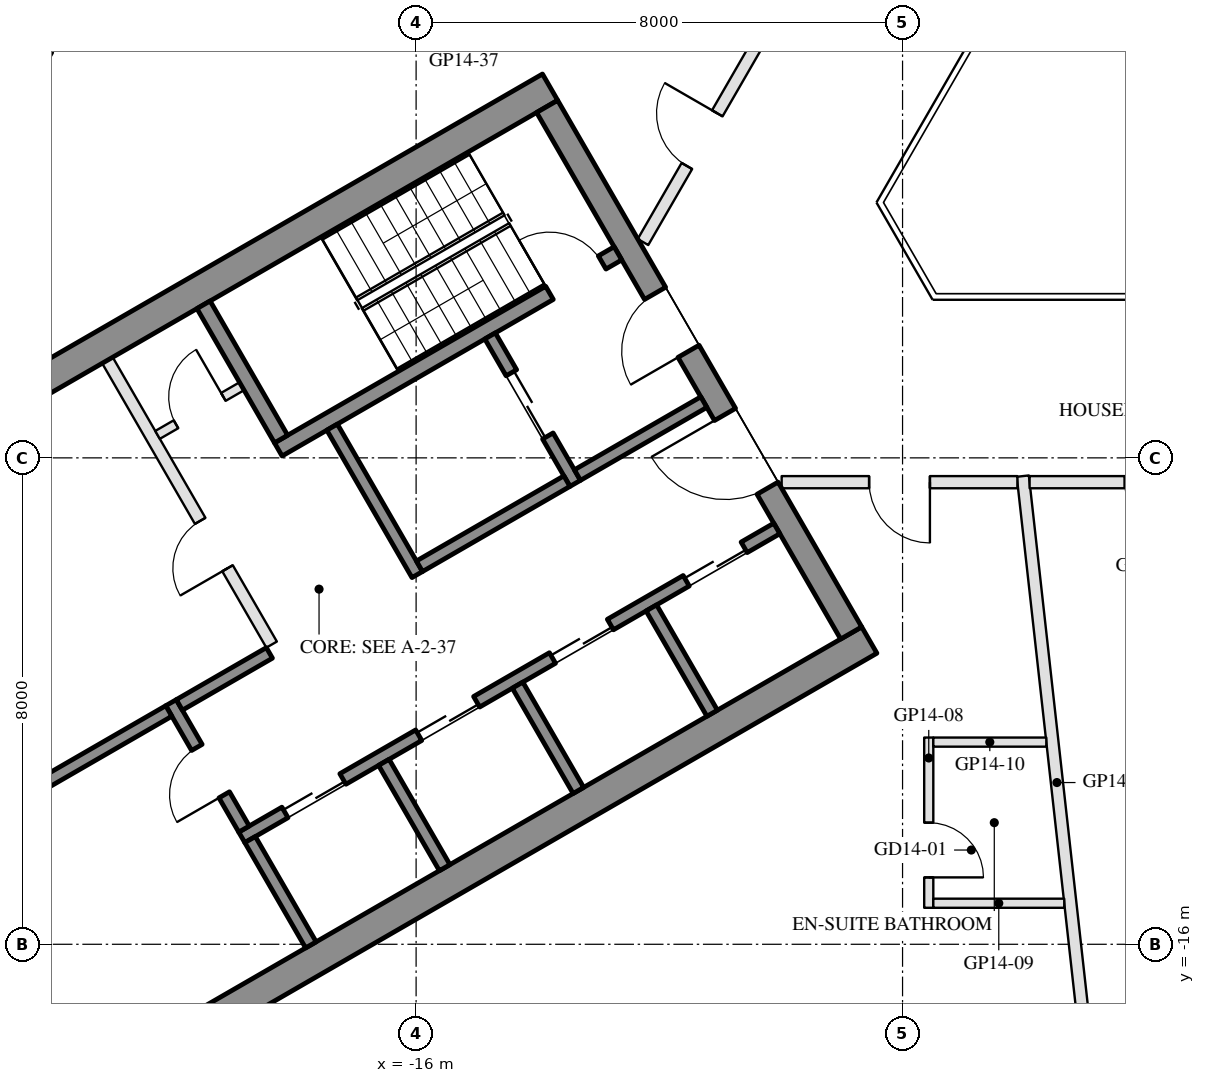
"""IFC4 building model, lengths in metres.
Left out: names, types, materials, properties, quantities, classifications, styles, units other than length and angle.
Written with IfcOpenShell. Run it as: python <this file> out.ifc"""

import sys

from ifc_helpers import new_model, si_unit, direction, frame, frame_2d, origin, place, context, subcontext, project, spatial, rectangle, extrude, element, fill, save


model = new_model("IFC4")
c1 = context("Model", 3, precision=1e-05, world=origin(), true_north=direction((0.0, 1.0)))
c2 = subcontext(c1, "Body", "Model", "MODEL_VIEW")
j1 = project(units=[si_unit("LENGTHUNIT", "METRE"), si_unit("PLANEANGLEUNIT", "RADIAN")], contexts=[c1])
p1 = place(None, origin())
s1 = spatial("IfcSite", under=j1, at=p1, CompositionType="ELEMENT")
p2 = place(p1, origin())
s2 = spatial("IfcBuilding", under=s1, at=p2, CompositionType="ELEMENT")
p3 = place(p2, frame((0.0, 0.0, 161.4)))
s3 = spatial("IfcBuildingStorey", under=s2, at=p3, CompositionType="ELEMENT", Elevation=161.4)
p4 = place(p3, frame((-20.309, 1.934, 0.0), z_axis=(0.0, 0.0, 1.0), x_axis=(-0.499992114976, -0.866029956157, 0.0)))
e1 = element("IfcWall", 1, at=p4, inside=s3, PredefinedType="SOLIDWALL", context=c2, shape_type="SweptSolid", body=[
    extrude(rectangle(XDim=6.74, YDim=0.35, at=frame_2d((3.37, 0.0))), origin(), (0.0, 0.0, 1.0), 3.55),
])
p5 = place(p4, frame((4.02, 0.0, 0.0)))
e2 = element("IfcOpeningElement", 2, at=p5, cuts=e1, PredefinedType="OPENING", context=c2, shape_type="SweptSolid", body=[
    extrude(rectangle(XDim=2.4, YDim=2.4, at=frame_2d((1.2, 1.2))), frame((0.0, 0.185, 0.0), z_axis=(0.0, -1.0, 0.0), x_axis=(1.0, 0.0, 0.0)), (0.0, 0.0, 1.0), 0.37),
])
p6 = place(p4, frame((0.77, 0.0, 0.3)))
e3 = element("IfcOpeningElement", 3, at=p6, cuts=e1, PredefinedType="OPENING", context=c2, shape_type="SweptSolid", body=[
    extrude(rectangle(XDim=2.9, YDim=2.65, at=frame_2d((1.45, 1.325))), frame((0.0, 0.185, 0.0), z_axis=(0.0, -1.0, 0.0), x_axis=(1.0, 0.0, 0.0)), (0.0, 0.0, 1.0), 0.37),
])
for number, where, z_axis, x_axis in (
    (4, (-13.797, -1.903, 0.0), (0.0, 0.0, 1.0), (-0.866, -0.5, 0.0)),
    (5, (-8.547, -10.997, 0.0), (0.0, 0.0, 1.0), (-0.866, -0.5, 0.0)),
):
    element("IfcWall", number, at=place(p3, frame(where, z_axis=z_axis, x_axis=x_axis)), inside=s3, PredefinedType="SHEAR", context=c2, shape_type="SweptSolid", body=[
        extrude(rectangle(XDim=14.837, YDim=0.5, at=frame_2d((7.418, 0.0))), origin(), (0.0, 0.0, 1.0), 3.5),
    ])
p7 = place(p3, frame((-13.845, -2.22, 0.0), z_axis=(0.0, 0.0, 1.0), x_axis=(0.500004234368, -0.866022959057, 0.0)))
e6 = element("IfcWall", 6, at=p7, inside=s3, PredefinedType="SHEAR", context=c2, shape_type="SweptSolid", body=[
    extrude(rectangle(XDim=10.0, YDim=0.4, at=frame_2d((5.0, 0.0))), origin(), (0.0, 0.0, 1.0), 3.5),
])
p8 = place(p7, frame((3.55, 0.0, 0.0)))
e7 = element("IfcOpeningElement", 7, at=p8, cuts=e6, PredefinedType="OPENING", context=c2, shape_type="SweptSolid", body=[
    extrude(rectangle(XDim=1.1, YDim=2.1, at=frame_2d((0.55, 1.05))), frame((0.0, 0.21, 0.0), z_axis=(0.0, -1.0, 0.0), x_axis=(1.0, 0.0, 0.0)), (0.0, 0.0, 1.0), 0.42),
])
p9 = place(p7, frame((5.85, 0.0, 0.0)))
e8 = element("IfcOpeningElement", 8, at=p9, cuts=e6, PredefinedType="OPENING", context=c2, shape_type="SweptSolid", body=[
    extrude(rectangle(XDim=1.4, YDim=2.1, at=frame_2d((0.7, 1.05))), frame((0.0, 0.21, 0.0), z_axis=(0.0, -1.0, 0.0), x_axis=(1.0, 0.0, 0.0)), (0.0, 0.0, 1.0), 0.42),
])
p10 = place(p3, frame((-12.681, -4.636, 0.0), z_axis=(0.0, 0.0, 1.0), x_axis=(-0.866021702275, -0.500006411147, 0.0)))
e9 = element("IfcWall", 9, at=p10, inside=s3, PredefinedType="SHEAR", context=c2, shape_type="SweptSolid", body=[
    extrude(rectangle(XDim=6.45, YDim=0.25, at=frame_2d((3.225, 0.0))), origin(), (0.0, 0.0, 1.0), 3.5),
])
p11 = place(p10, frame((0.3, 0.0, 0.0)))
e10 = element("IfcOpeningElement", 10, at=p11, cuts=e9, PredefinedType="OPENING", context=c2, shape_type="SweptSolid", body=[
    extrude(rectangle(XDim=1.0, YDim=2.1, at=frame_2d((0.5, 1.05))), frame((0.0, 0.135, 0.0), z_axis=(0.0, -1.0, 0.0), x_axis=(1.0, 0.0, 0.0)), (0.0, 0.0, 1.0), 0.27),
])
p12 = place(p3, frame((-19.496, -5.482, 0.0), z_axis=(0.0, 0.0, 1.0), x_axis=(0.499990435942, -0.866030925526, 0.0)))
e11 = element("IfcWall", 11, at=p12, inside=s3, PredefinedType="SHEAR", context=c2, shape_type="SweptSolid", body=[
    extrude(rectangle(XDim=2.55, YDim=0.25, at=frame_2d((1.275, 0.0))), origin(), (0.0, 0.0, 1.0), 3.5),
])
p13 = place(p3, frame((-17.381, -7.495, 0.0), z_axis=(0.0, 0.0, 1.0), x_axis=(0.500011755427, -0.866018616679, 0.0)))
e12 = element("IfcWall", 12, at=p13, inside=s3, PredefinedType="SHEAR", context=c2, shape_type="SweptSolid", body=[
    extrude(rectangle(XDim=2.8, YDim=0.2, at=frame_2d((1.4, 0.0))), origin(), (0.0, 0.0, 1.0), 3.5),
])
p14 = place(p3, frame((-14.783, -5.995, 0.0), z_axis=(0.0, 0.0, 1.0), x_axis=(0.49994636267, -0.866056369097, 0.0)))
e13 = element("IfcWall", 13, at=p14, inside=s3, PredefinedType="SHEAR", context=c2, shape_type="SweptSolid", body=[
    extrude(rectangle(XDim=2.8, YDim=0.2, at=frame_2d((1.4, 0.0))), origin(), (0.0, 0.0, 1.0), 3.5),
])
p15 = place(p14, frame((0.7, 0.0, 0.0)))
e14 = element("IfcOpeningElement", 14, at=p15, cuts=e13, PredefinedType="OPENING", context=c2, shape_type="SweptSolid", body=[
    extrude(rectangle(XDim=1.2, YDim=2.1, at=frame_2d((0.6, 1.05))), frame((0.0, 0.11, 0.0), z_axis=(0.0, -1.0, 0.0), x_axis=(1.0, 0.0, 0.0)), (0.0, 0.0, 1.0), 0.22),
])
p16 = place(p3, frame((-13.52, -8.383, 0.0), z_axis=(0.0, 0.0, 1.0), x_axis=(-0.866034573852, -0.49998411664, 0.0)))
e15 = element("IfcWall", 15, at=p16, inside=s3, PredefinedType="SHEAR", context=c2, shape_type="SweptSolid", body=[
    extrude(rectangle(XDim=2.8, YDim=0.2, at=frame_2d((1.4, 0.0))), origin(), (0.0, 0.0, 1.0), 3.5),
])
p17 = place(p3, frame((-11.268, -7.083, 0.0), z_axis=(0.0, 0.0, 1.0), x_axis=(-0.866050077142, -0.499957262057, 0.0)))
e16 = element("IfcWall", 16, at=p17, inside=s3, PredefinedType="SHEAR", context=c2, shape_type="SweptSolid", body=[
    extrude(rectangle(XDim=2.4, YDim=0.2, at=frame_2d((1.2, 0.0))), origin(), (0.0, 0.0, 1.0), 3.5),
])
p18 = place(p3, frame((-10.068, -9.162, 0.0), z_axis=(0.0, 0.0, 1.0), x_axis=(-0.866032725843, -0.499987317609, 0.0)))
e17 = element("IfcWall", 17, at=p18, inside=s3, PredefinedType="SHEAR", context=c2, shape_type="SweptSolid", body=[
    extrude(rectangle(XDim=10.16, YDim=0.2, at=frame_2d((5.08, 0.0))), origin(), (0.0, 0.0, 1.0), 3.5),
])
p19 = place(p18, frame((0.62, 0.0, 0.0)))
e18 = element("IfcOpeningElement", 18, at=p19, cuts=e17, PredefinedType="OPENING", context=c2, shape_type="SweptSolid", body=[
    extrude(rectangle(XDim=1.1, YDim=2.1, at=frame_2d((0.55, 1.05))), frame((0.0, 0.11, 0.0), z_axis=(0.0, -1.0, 0.0), x_axis=(1.0, 0.0, 0.0)), (0.0, 0.0, 1.0), 0.22),
])
p20 = place(p18, frame((3.16, 0.0, 0.0)))
e19 = element("IfcOpeningElement", 19, at=p20, cuts=e17, PredefinedType="OPENING", context=c2, shape_type="SweptSolid", body=[
    extrude(rectangle(XDim=1.1, YDim=2.1, at=frame_2d((0.55, 1.05))), frame((0.0, 0.11, 0.0), z_axis=(0.0, -1.0, 0.0), x_axis=(1.0, 0.0, 0.0)), (0.0, 0.0, 1.0), 0.22),
])
p21 = place(p18, frame((5.7, 0.0, 0.0)))
e20 = element("IfcOpeningElement", 20, at=p21, cuts=e17, PredefinedType="OPENING", context=c2, shape_type="SweptSolid", body=[
    extrude(rectangle(XDim=1.1, YDim=2.1, at=frame_2d((0.55, 1.05))), frame((0.0, 0.11, 0.0), z_axis=(0.0, -1.0, 0.0), x_axis=(1.0, 0.0, 0.0)), (0.0, 0.0, 1.0), 0.22),
])
p22 = place(p18, frame((8.24, 0.0, 0.0)))
e21 = element("IfcOpeningElement", 21, at=p22, cuts=e17, PredefinedType="OPENING", context=c2, shape_type="SweptSolid", body=[
    extrude(rectangle(XDim=1.1, YDim=2.1, at=frame_2d((0.55, 1.05))), frame((0.0, 0.11, 0.0), z_axis=(0.0, -1.0, 0.0), x_axis=(1.0, 0.0, 0.0)), (0.0, 0.0, 1.0), 0.22),
])
p23 = place(p3, frame((-20.031, -12.026, 0.0), z_axis=(0.0, 0.0, 1.0), x_axis=(0.500033551112, -0.866006032174, 0.0)))
e22 = element("IfcWall", 22, at=p23, inside=s3, PredefinedType="SHEAR", context=c2, shape_type="SweptSolid", body=[
    extrude(rectangle(XDim=2.4, YDim=0.2, at=frame_2d((1.2, 0.0))), origin(), (0.0, 0.0, 1.0), 3.5),
])
p24 = place(p23, frame((0.85, 0.0, 0.0)))
e23 = element("IfcOpeningElement", 23, at=p24, cuts=e22, PredefinedType="OPENING", context=c2, shape_type="SweptSolid", body=[
    extrude(rectangle(XDim=0.9, YDim=2.1, at=frame_2d((0.45, 1.05))), frame((0.0, 0.11, 0.0), z_axis=(0.0, -1.0, 0.0), x_axis=(1.0, 0.0, 0.0)), (0.0, 0.0, 1.0), 0.22),
])
p25 = place(p3, frame((-18.413, -11.208, 0.0), z_axis=(0.0, 0.0, 1.0), x_axis=(-0.866038183914, -0.499977863513, 0.0)))
e24 = element("IfcWall", 24, at=p25, inside=s3, PredefinedType="SHEAR", context=c2, shape_type="SweptSolid", body=[
    extrude(rectangle(XDim=1.71, YDim=0.2, at=frame_2d((0.855, 0.0))), origin(), (0.0, 0.0, 1.0), 3.5),
])
for number, where, z_axis, x_axis in (
    (25, (-12.131, -10.468, 0.0), (0.0, 0.0, 1.0), (0.5, -0.866, 0.0)),
    (26, (-14.331, -11.738, 0.0), (0.0, 0.0, 1.0), (0.5, -0.866, 0.0)),
    (27, (-16.531, -13.008, 0.0), (0.0, 0.0, 1.0), (0.5, -0.866, 0.0)),
    (28, (-18.73, -14.278, 0.0), (0.0, 0.0, 1.0), (0.5, -0.866, 0.0)),
):
    element("IfcWall", number, at=place(p3, frame(where, z_axis=z_axis, x_axis=x_axis)), inside=s3, PredefinedType="SHEAR", context=c2, shape_type="SweptSolid", body=[
        extrude(rectangle(XDim=2.0, YDim=0.2, at=frame_2d((1.0, 0.0))), origin(), (0.0, 0.0, 1.0), 3.5),
    ])
p26 = place(p3, frame((-20.067, -12.163, 0.0), z_axis=(0.0, 0.0, 1.0), x_axis=(-0.866055327414, -0.49994816717, 0.0)))
e29 = element("IfcWall", 29, at=p26, inside=s3, PredefinedType="SHEAR", context=c2, shape_type="SweptSolid", body=[
    extrude(rectangle(XDim=2.84, YDim=0.2, at=frame_2d((1.42, 0.0))), origin(), (0.0, 0.0, 1.0), 3.5),
])
p27 = place(p3, frame((-21.076, -6.395, 0.0), z_axis=(0.0, 0.0, 1.0), x_axis=(0.50001468107, -0.866016927499, 0.0)))
e30 = element("IfcWall", 30, at=p27, inside=s3, PredefinedType="PARTITIONING", context=c2, shape_type="SweptSolid", body=[
    extrude(rectangle(XDim=5.4, YDim=0.2, at=frame_2d((2.7, 0.0))), origin(), (0.0, 0.0, 1.0), 3.5),
])
p28 = place(p27, frame((3.05, 0.0, 0.0)))
e31 = element("IfcOpeningElement", 31, at=p28, cuts=e30, PredefinedType="OPENING", context=c2, shape_type="SweptSolid", body=[
    extrude(rectangle(XDim=0.9, YDim=2.1, at=frame_2d((0.45, 1.05))), frame((0.0, 0.11, 0.0), z_axis=(0.0, -1.0, 0.0), x_axis=(1.0, 0.0, 0.0)), (0.0, 0.0, 1.0), 0.22),
])
p29 = place(p3, frame((-18.866, -6.822, 0.0), z_axis=(0.0, 0.0, 1.0), x_axis=(-0.866028054938, -0.499995408039, 0.0)))
e32 = element("IfcWall", 32, at=p29, inside=s3, PredefinedType="PARTITIONING", context=c2, shape_type="SweptSolid", body=[
    extrude(rectangle(XDim=1.6, YDim=0.15, at=frame_2d((0.8, 0.0))), origin(), (0.0, 0.0, 1.0), 3.5),
])
p30 = place(p29, frame((0.35, 0.0, 0.0)))
e33 = element("IfcOpeningElement", 33, at=p30, cuts=e32, PredefinedType="OPENING", context=c2, shape_type="SweptSolid", body=[
    extrude(rectangle(XDim=0.9, YDim=2.1, at=frame_2d((0.45, 1.05))), frame((0.0, 0.085, 0.0), z_axis=(0.0, -1.0, 0.0), x_axis=(1.0, 0.0, 0.0)), (0.0, 0.0, 1.0), 0.17),
])
p31 = place(p3, frame((-4.9, -18.38, 0.0), z_axis=(0.0, 0.0, 1.0), x_axis=(-0.110634961609, 0.993861109648, 0.0)))
e34 = element("IfcWall", 34, at=p31, inside=s3, PredefinedType="PARTITIONING", context=c2, shape_type="SweptSolid", body=[
    extrude(rectangle(XDim=10.142, YDim=0.2, at=frame_2d((5.071, 0.0))), origin(), (0.0, 0.0, 1.0), 3.06),
])
p32 = place(p3, frame((-6.112, -8.4, 0.0), z_axis=(0.0, 0.0, 1.0), x_axis=(-1.0, 0.0, 0.0)))
e35 = element("IfcWall", 35, at=p32, inside=s3, PredefinedType="PARTITIONING", context=c2, shape_type="SweptSolid", body=[
    extrude(rectangle(XDim=3.876, YDim=0.2, at=frame_2d((1.938, 0.0))), origin(), (0.0, 0.0, 1.0), 2.95),
])
p33 = place(p32, frame((1.438, 0.0, 0.0)))
e36 = element("IfcOpeningElement", 36, at=p33, cuts=e35, PredefinedType="OPENING", context=c2, shape_type="SweptSolid", body=[
    extrude(rectangle(XDim=1.0, YDim=2.1, at=frame_2d((0.5, 1.05))), frame((0.0, 0.11, 0.0), z_axis=(0.0, -1.0, 0.0), x_axis=(1.0, 0.0, 0.0)), (0.0, 0.0, 1.0), 0.22),
])
p34 = place(p3, frame((-7.569, -12.6, 0.0), z_axis=(0.0, 0.0, 1.0), x_axis=(0.0, -1.0, 0.0)))
e37 = element("IfcWall", 37, at=p34, inside=s3, PredefinedType="PARTITIONING", context=c2, shape_type="SweptSolid", body=[
    extrude(rectangle(XDim=2.8, YDim=0.15, at=frame_2d((1.4, 0.0))), origin(), (0.0, 0.0, 1.0), 3.55),
])
p35 = place(p34, frame((1.4, 0.0, 0.0)))
e38 = element("IfcOpeningElement", 38, at=p35, cuts=e37, PredefinedType="OPENING", context=c2, shape_type="SweptSolid", body=[
    extrude(rectangle(XDim=0.9, YDim=2.1, at=frame_2d((0.45, 1.05))), frame((0.0, 0.085, 0.0), z_axis=(0.0, -1.0, 0.0), x_axis=(1.0, 0.0, 0.0)), (0.0, 0.0, 1.0), 0.17),
])
p36 = place(p3, frame((-7.494, -15.325, 0.0), z_axis=(0.0, 0.0, 1.0), x_axis=(1.0, 0.0, 0.0)))
e39 = element("IfcWall", 39, at=p36, inside=s3, PredefinedType="PARTITIONING", context=c2, shape_type="SweptSolid", body=[
    extrude(rectangle(XDim=2.153, YDim=0.15, at=frame_2d((1.077, 0.0))), origin(), (0.0, 0.0, 1.0), 3.55),
])
p37 = place(p3, frame((-7.494, -12.675, 0.0), z_axis=(0.0, 0.0, 1.0), x_axis=(1.0, 0.0, 0.0)))
e40 = element("IfcWall", 40, at=p37, inside=s3, PredefinedType="PARTITIONING", context=c2, shape_type="SweptSolid", body=[
    extrude(rectangle(XDim=1.858, YDim=0.15, at=frame_2d((0.929, 0.0))), origin(), (0.0, 0.0, 1.0), 3.55),
])
p38 = place(p3, frame((-1.881, -8.4, 0.0), z_axis=(0.0, 0.0, 1.0), x_axis=(-1.0, 0.0, 0.0)))
e41 = element("IfcWall", 41, at=p38, inside=s3, PredefinedType="PARTITIONING", context=c2, shape_type="SweptSolid", body=[
    extrude(rectangle(XDim=4.03, YDim=0.2, at=frame_2d((2.015, 0.0))), origin(), (0.0, 0.0, 1.0), 2.95),
])
p39 = place(p38, frame((1.565, 0.0, 0.0)))
e42 = element("IfcOpeningElement", 42, at=p39, cuts=e41, PredefinedType="OPENING", context=c2, shape_type="SweptSolid", body=[
    extrude(rectangle(XDim=0.9, YDim=2.1, at=frame_2d((0.45, 1.05))), frame((0.0, 0.11, 0.0), z_axis=(0.0, -1.0, 0.0), x_axis=(1.0, 0.0, 0.0)), (0.0, 0.0, 1.0), 0.22),
])
p40 = place(p3, frame((-12.269, -4.45, 0.0), z_axis=(0.0, 0.0, 1.0), x_axis=(0.500008716408, 0.866020371305, 0.0)))
e43 = element("IfcWall", 43, at=p40, inside=s3, PredefinedType="PARTITIONING", context=c2, shape_type="SweptSolid", body=[
    extrude(rectangle(XDim=3.888, YDim=0.2, at=frame_2d((1.944, 0.0))), origin(), (0.0, 0.0, 1.0), 2.95),
])
p41 = place(p40, frame((1.444, 0.0, 0.0)))
e44 = element("IfcOpeningElement", 44, at=p41, cuts=e43, PredefinedType="OPENING", context=c2, shape_type="SweptSolid", body=[
    extrude(rectangle(XDim=1.0, YDim=2.1, at=frame_2d((0.5, 1.05))), frame((0.0, 0.11, 0.0), z_axis=(0.0, -1.0, 0.0), x_axis=(1.0, 0.0, 0.0)), (0.0, 0.0, 1.0), 0.22),
])
p42 = place(p15, origin())
e45 = element("IfcDoor", 45, at=p42, inside=s3, OperationType="DOUBLE_DOOR_SLIDING", PredefinedType="DOOR", context=c2, shape_type="SweptSolid", body=[
    extrude(rectangle(XDim=1.2, YDim=2.1, at=frame_2d((0.6, 1.05))), frame((0.0, 0.025, 0.0), z_axis=(0.0, -1.0, 0.0), x_axis=(1.0, 0.0, 0.0)), (0.0, 0.0, 1.0), 0.05),
])
fill(e14, e45)
p43 = place(p30, frame((0.9, 0.0, 0.0), z_axis=(0.0, 0.0, 1.0), x_axis=(-1.0, 0.0, 0.0)))
e46 = element("IfcDoor", 46, at=p43, inside=s3, OperationType="SINGLE_SWING_RIGHT", PredefinedType="DOOR", context=c2, shape_type="SweptSolid", body=[
    extrude(rectangle(XDim=0.9, YDim=2.1, at=frame_2d((0.45, 1.05))), frame((0.0, 0.025, 0.0), z_axis=(0.0, -1.0, 0.0), x_axis=(1.0, 0.0, 0.0)), (0.0, 0.0, 1.0), 0.05),
])
fill(e33, e46)
p44 = place(p19, origin())
e47 = element("IfcDoor", 47, at=p44, inside=s3, OperationType="DOUBLE_DOOR_SLIDING", PredefinedType="DOOR", context=c2, shape_type="SweptSolid", body=[
    extrude(rectangle(XDim=1.1, YDim=2.1, at=frame_2d((0.55, 1.05))), frame((0.0, 0.025, 0.0), z_axis=(0.0, -1.0, 0.0), x_axis=(1.0, 0.0, 0.0)), (0.0, 0.0, 1.0), 0.05),
])
fill(e18, e47)
p45 = place(p20, origin())
e48 = element("IfcDoor", 48, at=p45, inside=s3, OperationType="DOUBLE_DOOR_SLIDING", PredefinedType="DOOR", context=c2, shape_type="SweptSolid", body=[
    extrude(rectangle(XDim=1.1, YDim=2.1, at=frame_2d((0.55, 1.05))), frame((0.0, 0.025, 0.0), z_axis=(0.0, -1.0, 0.0), x_axis=(1.0, 0.0, 0.0)), (0.0, 0.0, 1.0), 0.05),
])
fill(e19, e48)
p46 = place(p21, origin())
e49 = element("IfcDoor", 49, at=p46, inside=s3, OperationType="DOUBLE_DOOR_SLIDING", PredefinedType="DOOR", context=c2, shape_type="SweptSolid", body=[
    extrude(rectangle(XDim=1.1, YDim=2.1, at=frame_2d((0.55, 1.05))), frame((0.0, 0.025, 0.0), z_axis=(0.0, -1.0, 0.0), x_axis=(1.0, 0.0, 0.0)), (0.0, 0.0, 1.0), 0.05),
])
fill(e20, e49)
p47 = place(p22, origin())
e50 = element("IfcDoor", 50, at=p47, inside=s3, OperationType="DOUBLE_DOOR_SLIDING", PredefinedType="DOOR", context=c2, shape_type="SweptSolid", body=[
    extrude(rectangle(XDim=1.1, YDim=2.1, at=frame_2d((0.55, 1.05))), frame((0.0, 0.025, 0.0), z_axis=(0.0, -1.0, 0.0), x_axis=(1.0, 0.0, 0.0)), (0.0, 0.0, 1.0), 0.05),
])
fill(e21, e50)
p48 = place(p24, frame((0.9, 0.0, 0.0), z_axis=(0.0, 0.0, 1.0), x_axis=(-1.0, 0.0, 0.0)))
e51 = element("IfcDoor", 51, at=p48, inside=s3, OperationType="SINGLE_SWING_LEFT", PredefinedType="DOOR", context=c2, shape_type="SweptSolid", body=[
    extrude(rectangle(XDim=0.9, YDim=2.1, at=frame_2d((0.45, 1.05))), frame((0.0, 0.025, 0.0), z_axis=(0.0, -1.0, 0.0), x_axis=(1.0, 0.0, 0.0)), (0.0, 0.0, 1.0), 0.05),
])
fill(e23, e51)
p49 = place(p28, frame((0.9, 0.0, 0.0), z_axis=(0.0, 0.0, 1.0), x_axis=(-1.0, 0.0, 0.0)))
e52 = element("IfcDoor", 52, at=p49, inside=s3, OperationType="SINGLE_SWING_LEFT", PredefinedType="DOOR", context=c2, shape_type="SweptSolid", body=[
    extrude(rectangle(XDim=0.9, YDim=2.1, at=frame_2d((0.45, 1.05))), frame((0.0, 0.025, 0.0), z_axis=(0.0, -1.0, 0.0), x_axis=(1.0, 0.0, 0.0)), (0.0, 0.0, 1.0), 0.05),
])
fill(e31, e52)
p50 = place(p8, frame((1.1, 0.0, 0.0), z_axis=(0.0, 0.0, 1.0), x_axis=(-1.0, 0.0, 0.0)))
e53 = element("IfcDoor", 53, at=p50, inside=s3, OperationType="SINGLE_SWING_LEFT", PredefinedType="DOOR", context=c2, shape_type="SweptSolid", body=[
    extrude(rectangle(XDim=1.1, YDim=2.1, at=frame_2d((0.55, 1.05))), frame((0.0, 0.025, 0.0), z_axis=(0.0, -1.0, 0.0), x_axis=(1.0, 0.0, 0.0)), (0.0, 0.0, 1.0), 0.05),
])
fill(e7, e53)
p51 = place(p9, frame((1.4, 0.0, 0.0), z_axis=(0.0, 0.0, 1.0), x_axis=(-1.0, 0.0, 0.0)))
e54 = element("IfcDoor", 54, at=p51, inside=s3, OperationType="DOUBLE_DOOR_SINGLE_SWING", PredefinedType="DOOR", context=c2, shape_type="SweptSolid", body=[
    extrude(rectangle(XDim=1.4, YDim=2.1, at=frame_2d((0.7, 1.05))), frame((0.0, 0.025, 0.0), z_axis=(0.0, -1.0, 0.0), x_axis=(1.0, 0.0, 0.0)), (0.0, 0.0, 1.0), 0.05),
])
fill(e8, e54)
p52 = place(p11, frame((1.0, 0.0, 0.0), z_axis=(0.0, 0.0, 1.0), x_axis=(-1.0, 0.0, 0.0)))
e55 = element("IfcDoor", 55, at=p52, inside=s3, OperationType="SINGLE_SWING_LEFT", PredefinedType="DOOR", context=c2, shape_type="SweptSolid", body=[
    extrude(rectangle(XDim=1.0, YDim=2.1, at=frame_2d((0.5, 1.05))), frame((0.0, 0.025, 0.0), z_axis=(0.0, -1.0, 0.0), x_axis=(1.0, 0.0, 0.0)), (0.0, 0.0, 1.0), 0.05),
])
fill(e10, e55)
p53 = place(p35, origin())
e56 = element("IfcDoor", 56, at=p53, inside=s3, OperationType="SINGLE_SWING_RIGHT", PredefinedType="DOOR", context=c2, shape_type="SweptSolid", body=[
    extrude(rectangle(XDim=0.9, YDim=2.1, at=frame_2d((0.45, 1.05))), frame((0.0, 0.025, 0.0), z_axis=(0.0, -1.0, 0.0), x_axis=(1.0, 0.0, 0.0)), (0.0, 0.0, 1.0), 0.05),
])
fill(e38, e56)
p54 = place(p33, origin())
e57 = element("IfcDoor", 57, at=p54, inside=s3, OperationType="SINGLE_SWING_LEFT", PredefinedType="DOOR", context=c2, shape_type="SweptSolid", body=[
    extrude(rectangle(XDim=1.0, YDim=2.1, at=frame_2d((0.5, 1.05))), frame((0.0, 0.025, 0.0), z_axis=(0.0, -1.0, 0.0), x_axis=(1.0, 0.0, 0.0)), (0.0, 0.0, 1.0), 0.05),
])
fill(e36, e57)
p55 = place(p41, origin())
e58 = element("IfcDoor", 58, at=p55, inside=s3, OperationType="SINGLE_SWING_RIGHT", PredefinedType="DOOR", context=c2, shape_type="SweptSolid", body=[
    extrude(rectangle(XDim=1.0, YDim=2.1, at=frame_2d((0.5, 1.05))), frame((0.0, 0.025, 0.0), z_axis=(0.0, -1.0, 0.0), x_axis=(1.0, 0.0, 0.0)), (0.0, 0.0, 1.0), 0.05),
])
fill(e44, e58)
save(model, sys.argv[1])
